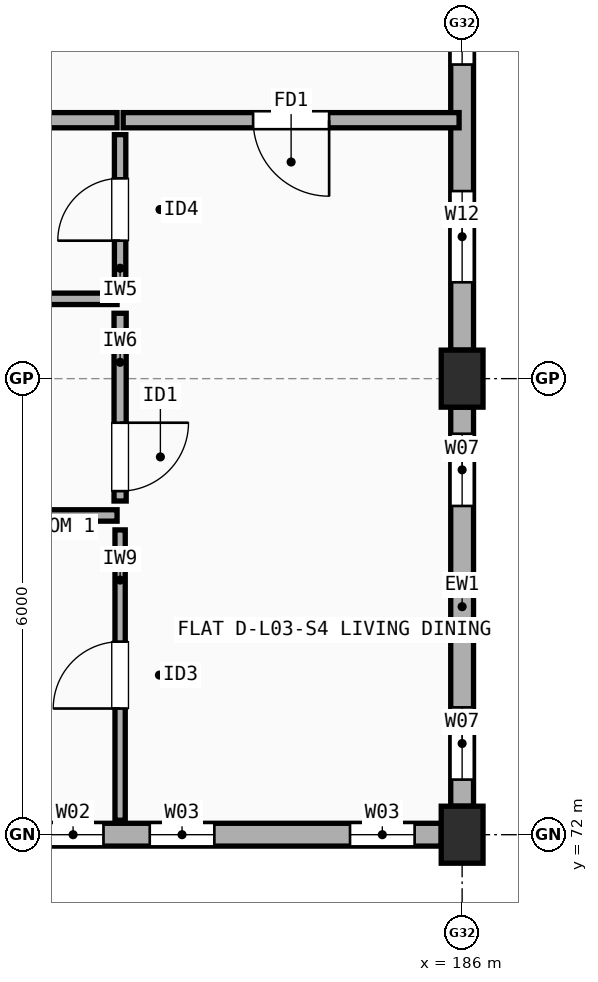
"""IFC4 building model, lengths in metres.
Left out: names, types, materials, properties, quantities, classifications, styles, units other than length and angle.
Written with IfcOpenShell. Run it as: python <this file> out.ifc"""

import sys

from ifc_helpers import new_model, si_unit, direction, frame, frame_2d, origin, origin_2d, place, context, subcontext, project, spatial, rectangle, extrude, element, fill, save


model = new_model("IFC4")
c1 = context("Model", 3, precision=1e-05, world=origin(), true_north=direction((0.0, 1.0)))
c2 = subcontext(c1, "Body", "Model", "MODEL_VIEW")
j1 = project(units=[si_unit("LENGTHUNIT", "METRE"), si_unit("PLANEANGLEUNIT", "RADIAN")], contexts=[c1])
p1 = place(None, origin())
s1 = spatial("IfcSite", under=j1, at=p1, CompositionType="ELEMENT")
p2 = place(p1, origin())
s2 = spatial("IfcBuilding", under=s1, at=p2, CompositionType="ELEMENT")
p3 = place(p2, frame((0.0, 0.0, 10.9)))
s3 = spatial("IfcBuildingStorey", under=s2, at=p3, CompositionType="ELEMENT", Elevation=10.9)
for number, where, z_axis, x_axis in (
    (1, (186.0, 72.0, 0.0), (0.0, 0.0, 1.0), (1.0, 0.0, 0.0)),
    (2, (186.0, 78.0, 0.0), (0.0, 0.0, 1.0), (1.0, 0.0, 0.0)),
):
    element("IfcColumn", number, at=place(p3, frame(where, z_axis=z_axis, x_axis=x_axis)), inside=s3, PredefinedType="COLUMN", context=c2, shape_type="SweptSolid", body=[
        extrude(rectangle(XDim=0.55, YDim=0.75, at=origin_2d()), origin(), (0.0, 0.0, 1.0), 2.96),
    ])
p4 = place(p3, frame((180.325, 72.0, 0.0), z_axis=(0.0, 0.0, 1.0), x_axis=(1.0, 0.0, 0.0)))
e3 = element("IfcWall", 3, at=p4, inside=s3, PredefinedType="STANDARD", context=c2, shape_type="SweptSolid", body=[
    extrude(rectangle(XDim=5.4, YDim=0.3, at=frame_2d((2.7, 0.0))), origin(), (0.0, 0.0, 1.0), 2.442),
])
p5 = place(p4, frame((1.565, 0.0, 0.9)))
e4 = element("IfcOpeningElement", 4, at=p5, cuts=e3, PredefinedType="OPENING", context=c2, shape_type="SweptSolid", body=[
    extrude(rectangle(XDim=0.85, YDim=1.25, at=frame_2d((0.425, 0.625))), frame((0.0, 0.16, 0.0), z_axis=(0.0, -1.0, 0.0), x_axis=(1.0, 0.0, 0.0)), (0.0, 0.0, 1.0), 0.32),
])
p6 = place(p4, frame((4.2, 0.0, 0.9)))
e5 = element("IfcOpeningElement", 5, at=p6, cuts=e3, PredefinedType="OPENING", context=c2, shape_type="SweptSolid", body=[
    extrude(rectangle(XDim=0.85, YDim=1.25, at=frame_2d((0.425, 0.625))), frame((0.0, 0.16, 0.0), z_axis=(0.0, -1.0, 0.0), x_axis=(1.0, 0.0, 0.0)), (0.0, 0.0, 1.0), 0.32),
])
p7 = place(p4, frame((0.156, 0.0, 0.9)))
e6 = element("IfcOpeningElement", 6, at=p7, cuts=e3, PredefinedType="OPENING", context=c2, shape_type="SweptSolid", body=[
    extrude(rectangle(XDim=0.8, YDim=1.2, at=frame_2d((0.4, 0.6))), frame((0.0, 0.16, 0.0), z_axis=(0.0, -1.0, 0.0), x_axis=(1.0, 0.0, 0.0)), (0.0, 0.0, 1.0), 0.32),
])
p8 = place(p3, frame((186.0, 72.375, 0.0), z_axis=(0.0, 0.0, 1.0), x_axis=(0.0, 1.0, 0.0)))
e7 = element("IfcWall", 7, at=p8, inside=s3, PredefinedType="STANDARD", context=c2, shape_type="SweptSolid", body=[
    extrude(rectangle(XDim=5.25, YDim=0.3, at=frame_2d((2.625, 0.0))), origin(), (0.0, 0.0, 1.0), 2.442),
])
p9 = place(p8, frame((0.35, 0.0, 0.9)))
e8 = element("IfcOpeningElement", 8, at=p9, cuts=e7, PredefinedType="OPENING", context=c2, shape_type="SweptSolid", body=[
    extrude(rectangle(XDim=0.95, YDim=1.35, at=frame_2d((0.475, 0.675))), frame((0.0, 0.16, 0.0), z_axis=(0.0, -1.0, 0.0), x_axis=(1.0, 0.0, 0.0)), (0.0, 0.0, 1.0), 0.32),
])
p10 = place(p8, frame((3.95, 0.0, 0.9)))
e9 = element("IfcOpeningElement", 9, at=p10, cuts=e7, PredefinedType="OPENING", context=c2, shape_type="SweptSolid", body=[
    extrude(rectangle(XDim=0.95, YDim=1.35, at=frame_2d((0.475, 0.675))), frame((0.0, 0.16, 0.0), z_axis=(0.0, -1.0, 0.0), x_axis=(1.0, 0.0, 0.0)), (0.0, 0.0, 1.0), 0.32),
])
p11 = place(p3, frame((186.0, 78.375, 0.0), z_axis=(0.0, 0.0, 1.0), x_axis=(0.0, 1.0, 0.0)))
e10 = element("IfcWall", 10, at=p11, inside=s3, PredefinedType="STANDARD", context=c2, shape_type="SweptSolid", body=[
    extrude(rectangle(XDim=5.25, YDim=0.3, at=frame_2d((2.625, 0.0))), origin(), (0.0, 0.0, 1.0), 2.442),
])
p12 = place(p11, frame((0.893, 0.0, 0.9)))
e11 = element("IfcOpeningElement", 11, at=p12, cuts=e10, PredefinedType="OPENING", context=c2, shape_type="SweptSolid", body=[
    extrude(rectangle(XDim=1.2, YDim=1.35, at=frame_2d((0.6, 0.675))), frame((0.0, 0.16, 0.0), z_axis=(0.0, -1.0, 0.0), x_axis=(1.0, 0.0, 0.0)), (0.0, 0.0, 1.0), 0.32),
])
p13 = place(p11, frame((3.758, 0.0, 0.9)))
e12 = element("IfcOpeningElement", 12, at=p13, cuts=e10, PredefinedType="OPENING", context=c2, shape_type="SweptSolid", body=[
    extrude(rectangle(XDim=0.8, YDim=1.2, at=frame_2d((0.4, 0.6))), frame((0.0, 0.16, 0.0), z_axis=(0.0, -1.0, 0.0), x_axis=(1.0, 0.0, 0.0)), (0.0, 0.0, 1.0), 0.32),
])
p14 = place(p3, frame((178.54, 81.4, 0.0), z_axis=(0.0, 0.0, 1.0), x_axis=(1.0, 0.0, 0.0)))
e13 = element("IfcWall", 13, at=p14, inside=s3, PredefinedType="SOLIDWALL", context=c2, shape_type="SweptSolid", body=[
    extrude(rectangle(XDim=2.92, YDim=0.2, at=frame_2d((1.46, 0.0))), origin(), (0.0, 0.0, 1.0), 2.458),
])
p15 = place(p3, frame((181.54, 81.4, 0.0), z_axis=(0.0, 0.0, 1.0), x_axis=(1.0, 0.0, 0.0)))
e14 = element("IfcWall", 14, at=p15, inside=s3, PredefinedType="SOLIDWALL", context=c2, shape_type="SweptSolid", body=[
    extrude(rectangle(XDim=4.42, YDim=0.2, at=frame_2d((2.21, 0.0))), origin(), (0.0, 0.0, 1.0), 2.442),
])
p16 = place(p15, frame((1.71, 0.0, 0.0)))
e15 = element("IfcOpeningElement", 15, at=p16, cuts=e14, PredefinedType="OPENING", context=c2, shape_type="SweptSolid", body=[
    extrude(rectangle(XDim=1.0, YDim=2.15, at=frame_2d((0.5, 1.075))), frame((0.0, 0.11, 0.0), z_axis=(0.0, -1.0, 0.0), x_axis=(1.0, 0.0, 0.0)), (0.0, 0.0, 1.0), 0.22),
])
p17 = place(p3, frame((181.5, 72.19, 0.0), z_axis=(0.0, 0.0, 1.0), x_axis=(0.0, 1.0, 0.0)))
e16 = element("IfcWall", 16, at=p17, inside=s3, PredefinedType="PARTITIONING", context=c2, shape_type="SweptSolid", body=[
    extrude(rectangle(XDim=3.82, YDim=0.135, at=frame_2d((1.91, 0.0))), origin(), (0.0, 0.0, 1.0), 2.96),
])
p18 = place(p17, frame((1.47, 0.0, 0.0)))
e17 = element("IfcOpeningElement", 17, at=p18, cuts=e16, PredefinedType="OPENING", context=c2, shape_type="SweptSolid", body=[
    extrude(rectangle(XDim=0.88, YDim=2.1, at=frame_2d((0.44, 1.05))), frame((0.0, 0.077, 0.0), z_axis=(0.0, -1.0, 0.0), x_axis=(1.0, 0.0, 0.0)), (0.0, 0.0, 1.0), 0.155),
])
p19 = place(p3, frame((181.5, 76.39, 0.0), z_axis=(0.0, 0.0, 1.0), x_axis=(0.0, 1.0, 0.0)))
e18 = element("IfcWall", 18, at=p19, inside=s3, PredefinedType="PLUMBINGWALL", context=c2, shape_type="SweptSolid", body=[
    extrude(rectangle(XDim=2.47, YDim=0.16, at=frame_2d((1.235, 0.0))), origin(), (0.0, 0.0, 1.0), 2.442),
])
p20 = place(p19, frame((0.13, 0.0, 0.0)))
e19 = element("IfcOpeningElement", 19, at=p20, cuts=e18, PredefinedType="OPENING", context=c2, shape_type="SweptSolid", body=[
    extrude(rectangle(XDim=0.9, YDim=2.1, at=frame_2d((0.45, 1.05))), frame((0.0, 0.09, 0.0), z_axis=(0.0, -1.0, 0.0), x_axis=(1.0, 0.0, 0.0)), (0.0, 0.0, 1.0), 0.18),
])
p21 = place(p3, frame((181.5, 79.24, 0.0), z_axis=(0.0, 0.0, 1.0), x_axis=(0.0, 1.0, 0.0)))
e20 = element("IfcWall", 20, at=p21, inside=s3, PredefinedType="PARTITIONING", context=c2, shape_type="SweptSolid", body=[
    extrude(rectangle(XDim=1.97, YDim=0.15, at=frame_2d((0.985, 0.0))), origin(), (0.0, 0.0, 1.0), 2.96),
])
p22 = place(p21, frame((0.575, 0.0, 0.0)))
e21 = element("IfcOpeningElement", 21, at=p22, cuts=e20, PredefinedType="OPENING", context=c2, shape_type="SweptSolid", body=[
    extrude(rectangle(XDim=0.82, YDim=2.08, at=frame_2d((0.41, 1.04))), frame((0.0, 0.085, 0.0), z_axis=(0.0, -1.0, 0.0), x_axis=(1.0, 0.0, 0.0)), (0.0, 0.0, 1.0), 0.17),
])
p23 = place(p3, frame((178.54, 76.2, 0.0), z_axis=(0.0, 0.0, 1.0), x_axis=(1.0, 0.0, 0.0)))
e22 = element("IfcWall", 22, at=p23, inside=s3, PredefinedType="PARTITIONING", context=c2, shape_type="SweptSolid", body=[
    extrude(rectangle(XDim=2.92, YDim=0.15, at=frame_2d((1.46, 0.0))), origin(), (0.0, 0.0, 1.0), 2.508),
])
p24 = place(p3, frame((178.54, 79.05, 0.0), z_axis=(0.0, 0.0, 1.0), x_axis=(1.0, 0.0, 0.0)))
e23 = element("IfcWall", 23, at=p24, inside=s3, PredefinedType="PARTITIONING", context=c2, shape_type="SweptSolid", body=[
    extrude(rectangle(XDim=2.92, YDim=0.15, at=frame_2d((1.46, 0.0))), origin(), (0.0, 0.0, 1.0), 2.458),
])
p25 = place(p5, origin())
e24 = element("IfcWindow", 24, at=p25, inside=s3, PartitioningType="SINGLE_PANEL", PredefinedType="WINDOW", context=c2, shape_type="SweptSolid", body=[
    extrude(rectangle(XDim=0.85, YDim=1.25, at=frame_2d((0.425, 0.625))), frame((0.0, 0.03, 0.0), z_axis=(0.0, -1.0, 0.0), x_axis=(1.0, 0.0, 0.0)), (0.0, 0.0, 1.0), 0.06),
])
fill(e4, e24)
p26 = place(p6, origin())
e25 = element("IfcWindow", 25, at=p26, inside=s3, PartitioningType="SINGLE_PANEL", PredefinedType="WINDOW", context=c2, shape_type="SweptSolid", body=[
    extrude(rectangle(XDim=0.85, YDim=1.25, at=frame_2d((0.425, 0.625))), frame((0.0, 0.03, 0.0), z_axis=(0.0, -1.0, 0.0), x_axis=(1.0, 0.0, 0.0)), (0.0, 0.0, 1.0), 0.06),
])
fill(e5, e25)
p27 = place(p9, origin())
e26 = element("IfcWindow", 26, at=p27, inside=s3, PartitioningType="SINGLE_PANEL", PredefinedType="WINDOW", context=c2, shape_type="SweptSolid", body=[
    extrude(rectangle(XDim=0.95, YDim=1.35, at=frame_2d((0.475, 0.675))), frame((0.0, 0.03, 0.0), z_axis=(0.0, -1.0, 0.0), x_axis=(1.0, 0.0, 0.0)), (0.0, 0.0, 1.0), 0.06),
])
fill(e8, e26)
p28 = place(p10, origin())
e27 = element("IfcWindow", 27, at=p28, inside=s3, PartitioningType="SINGLE_PANEL", PredefinedType="WINDOW", context=c2, shape_type="SweptSolid", body=[
    extrude(rectangle(XDim=0.95, YDim=1.35, at=frame_2d((0.475, 0.675))), frame((0.0, 0.03, 0.0), z_axis=(0.0, -1.0, 0.0), x_axis=(1.0, 0.0, 0.0)), (0.0, 0.0, 1.0), 0.06),
])
fill(e9, e27)
p29 = place(p12, origin())
e28 = element("IfcWindow", 28, at=p29, inside=s3, PartitioningType="SINGLE_PANEL", PredefinedType="WINDOW", context=c2, shape_type="SweptSolid", body=[
    extrude(rectangle(XDim=1.2, YDim=1.35, at=frame_2d((0.6, 0.675))), frame((0.0, 0.03, 0.0), z_axis=(0.0, -1.0, 0.0), x_axis=(1.0, 0.0, 0.0)), (0.0, 0.0, 1.0), 0.06),
])
fill(e11, e28)
p30 = place(p13, origin())
e29 = element("IfcWindow", 29, at=p30, inside=s3, PartitioningType="SINGLE_PANEL", PredefinedType="WINDOW", context=c2, shape_type="SweptSolid", body=[
    extrude(rectangle(XDim=0.8, YDim=1.2, at=frame_2d((0.4, 0.6))), frame((0.0, 0.03, 0.0), z_axis=(0.0, -1.0, 0.0), x_axis=(1.0, 0.0, 0.0)), (0.0, 0.0, 1.0), 0.06),
])
fill(e12, e29)
p31 = place(p7, origin())
e30 = element("IfcWindow", 30, at=p31, inside=s3, PartitioningType="SINGLE_PANEL", PredefinedType="WINDOW", context=c2, shape_type="SweptSolid", body=[
    extrude(rectangle(XDim=0.8, YDim=1.2, at=frame_2d((0.4, 0.6))), frame((0.0, 0.03, 0.0), z_axis=(0.0, -1.0, 0.0), x_axis=(1.0, 0.0, 0.0)), (0.0, 0.0, 1.0), 0.06),
])
fill(e6, e30)
p32 = place(p16, origin())
e31 = element("IfcDoor", 31, at=p32, inside=s3, OperationType="SINGLE_SWING_RIGHT", PredefinedType="DOOR", context=c2, shape_type="SweptSolid", body=[
    extrude(rectangle(XDim=1.0, YDim=2.15, at=frame_2d((0.5, 1.075))), frame((0.0, 0.025, 0.0), z_axis=(0.0, -1.0, 0.0), x_axis=(1.0, 0.0, 0.0)), (0.0, 0.0, 1.0), 0.05),
])
fill(e15, e31)
p33 = place(p18, origin())
e32 = element("IfcDoor", 32, at=p33, inside=s3, OperationType="SINGLE_SWING_LEFT", PredefinedType="DOOR", context=c2, shape_type="SweptSolid", body=[
    extrude(rectangle(XDim=0.88, YDim=2.1, at=frame_2d((0.44, 1.05))), frame((0.0, 0.025, 0.0), z_axis=(0.0, -1.0, 0.0), x_axis=(1.0, 0.0, 0.0)), (0.0, 0.0, 1.0), 0.05),
])
fill(e17, e32)
p34 = place(p20, origin())
e33 = element("IfcDoor", 33, at=p34, inside=s3, OperationType="SINGLE_SWING_RIGHT", PredefinedType="DOOR", context=c2, shape_type="SweptSolid", body=[
    extrude(rectangle(XDim=0.9, YDim=2.1, at=frame_2d((0.45, 1.05))), frame((0.0, 0.025, 0.0), z_axis=(0.0, -1.0, 0.0), x_axis=(1.0, 0.0, 0.0)), (0.0, 0.0, 1.0), 0.05),
])
fill(e19, e33)
p35 = place(p22, origin())
e34 = element("IfcDoor", 34, at=p35, inside=s3, OperationType="SINGLE_SWING_LEFT", PredefinedType="DOOR", context=c2, shape_type="SweptSolid", body=[
    extrude(rectangle(XDim=0.82, YDim=2.08, at=frame_2d((0.41, 1.04))), frame((0.0, 0.025, 0.0), z_axis=(0.0, -1.0, 0.0), x_axis=(1.0, 0.0, 0.0)), (0.0, 0.0, 1.0), 0.05),
])
fill(e21, e34)
save(model, sys.argv[1])
